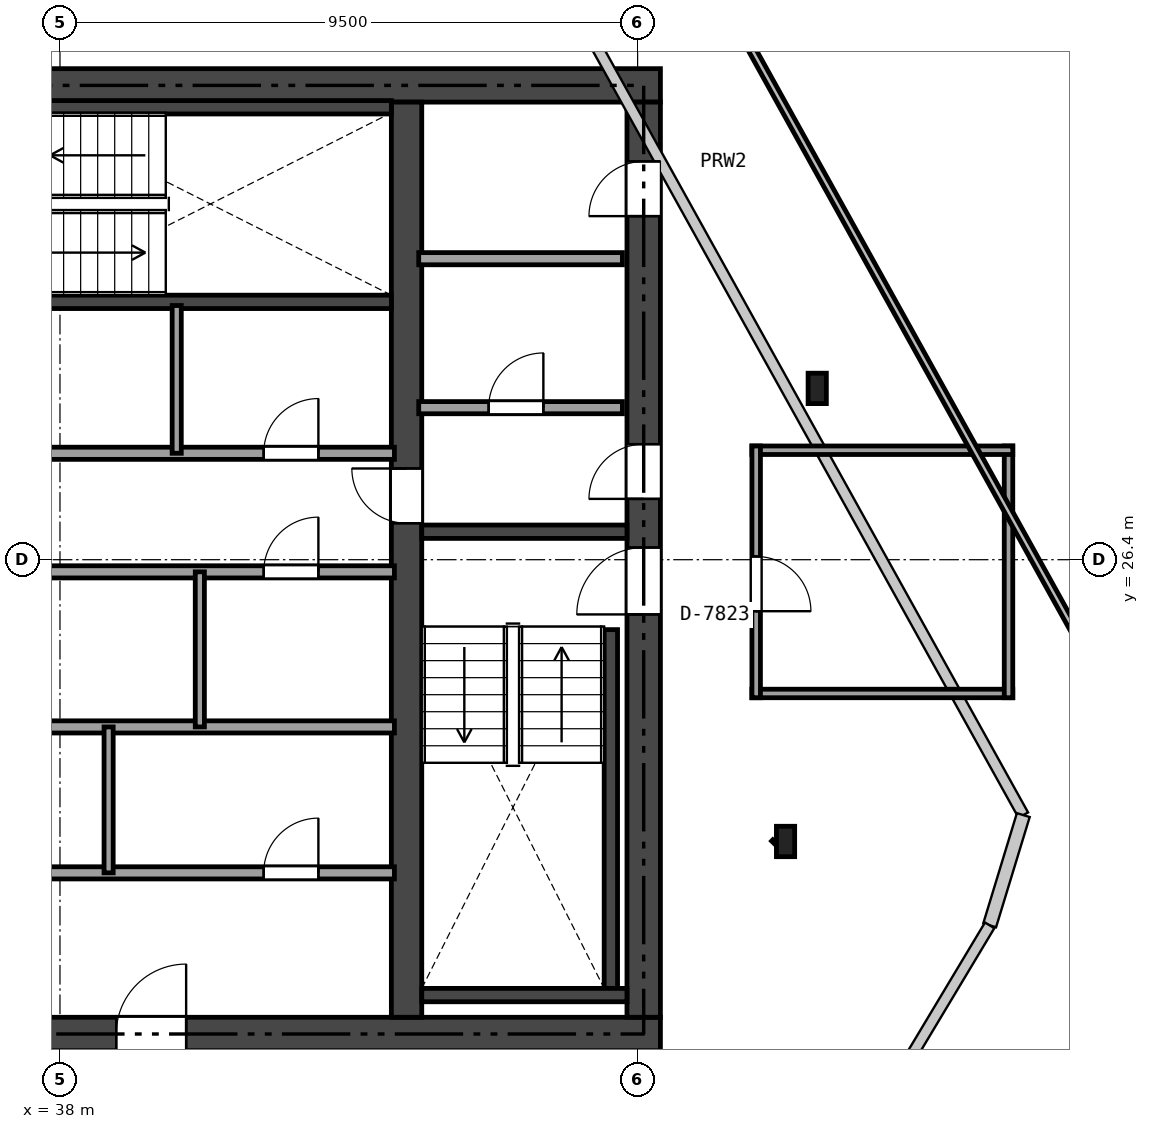
"""IFC4 building model, lengths in metres.
Left out: names, types, materials, properties, quantities, classifications, styles, units other than length and angle.
Written with IfcOpenShell. Run it as: python <this file> out.ifc"""

import sys

from ifc_helpers import new_model, si_unit, direction, frame, frame_2d, origin, origin_2d, place, context, subcontext, project, spatial, rectangle, i_section, extrude, element, fill, save


model = new_model("IFC4")
c1 = context("Model", 3, precision=1e-05, world=origin(), true_north=direction((0.0, 1.0)))
c2 = subcontext(c1, "Body", "Model", "MODEL_VIEW")
j1 = project(units=[si_unit("LENGTHUNIT", "METRE"), si_unit("PLANEANGLEUNIT", "RADIAN")], contexts=[c1])
p1 = place(None, origin())
s1 = spatial("IfcSite", under=j1, at=p1, CompositionType="ELEMENT")
p2 = place(p1, origin())
s2 = spatial("IfcBuilding", under=s1, at=p2, CompositionType="ELEMENT")
p3 = place(p2, frame((0.0, 0.0, 289.9)))
s3 = spatial("IfcBuildingStorey", under=s2, at=p3, CompositionType="ELEMENT", Elevation=289.9)
p4 = place(p3, frame((26.525, 18.6, 0.0), z_axis=(0.0, 0.0, 1.0), x_axis=(1.0, 0.0, 0.0)))
e1 = element("IfcWall", 1, at=p4, inside=s3, PredefinedType="SHEAR", context=c2, shape_type="SweptSolid", body=[
    extrude(rectangle(XDim=21.35, YDim=0.55, at=frame_2d((10.675, 0.0))), origin(), (0.0, 0.0, 1.0), 2.58),
])
p5 = place(p4, frame((12.4, 0.0, 0.0)))
e2 = element("IfcOpeningElement", 2, at=p5, cuts=e1, PredefinedType="OPENING", context=c2, shape_type="SweptSolid", body=[
    extrude(rectangle(XDim=1.15, YDim=2.15, at=frame_2d((0.575, 1.075))), frame((0.0, 0.285, 0.0), z_axis=(0.0, -1.0, 0.0), x_axis=(1.0, 0.0, 0.0)), (0.0, 0.0, 1.0), 0.57),
])
p6 = place(p4, frame((5.225, 0.0, 0.0)))
e3 = element("IfcOpeningElement", 3, at=p6, cuts=e1, PredefinedType="OPENING", context=c2, shape_type="SweptSolid", body=[
    extrude(rectangle(XDim=0.9, YDim=2.1, at=frame_2d((0.45, 1.05))), frame((0.0, 0.285, 0.0), z_axis=(0.0, -1.0, 0.0), x_axis=(1.0, 0.0, 0.0)), (0.0, 0.0, 1.0), 0.57),
])
p7 = place(p3, frame((26.525, 34.2, 0.0), z_axis=(0.0, 0.0, 1.0), x_axis=(1.0, 0.0, 0.0)))
e4 = element("IfcWall", 4, at=p7, inside=s3, PredefinedType="SHEAR", context=c2, shape_type="SweptSolid", body=[
    extrude(rectangle(XDim=21.35, YDim=0.55, at=frame_2d((10.675, 0.0))), origin(), (0.0, 0.0, 1.0), 2.58),
])
p8 = place(p7, frame((9.675, 0.0, 0.0)))
e5 = element("IfcOpeningElement", 5, at=p8, cuts=e4, PredefinedType="OPENING", context=c2, shape_type="SweptSolid", body=[
    extrude(rectangle(XDim=1.1, YDim=2.15, at=frame_2d((0.55, 1.075))), frame((0.0, 0.285, 0.0), z_axis=(0.0, -1.0, 0.0), x_axis=(1.0, 0.0, 0.0)), (0.0, 0.0, 1.0), 0.57),
])
p9 = place(p7, frame((1.925, 0.0, 0.0)))
e6 = element("IfcOpeningElement", 6, at=p9, cuts=e4, PredefinedType="OPENING", context=c2, shape_type="SweptSolid", body=[
    extrude(rectangle(XDim=0.9, YDim=2.1, at=frame_2d((0.45, 1.05))), frame((0.0, 0.285, 0.0), z_axis=(0.0, -1.0, 0.0), x_axis=(1.0, 0.0, 0.0)), (0.0, 0.0, 1.0), 0.57),
])
p10 = place(p7, frame((6.225, 0.0, 0.0)))
e7 = element("IfcOpeningElement", 7, at=p10, cuts=e4, PredefinedType="OPENING", context=c2, shape_type="SweptSolid", body=[
    extrude(rectangle(XDim=0.9, YDim=2.1, at=frame_2d((0.45, 1.05))), frame((0.0, 0.285, 0.0), z_axis=(0.0, -1.0, 0.0), x_axis=(1.0, 0.0, 0.0)), (0.0, 0.0, 1.0), 0.57),
])
p11 = place(p3, frame((47.6, 18.875, 0.0), z_axis=(0.0, 0.0, 1.0), x_axis=(0.0, 1.0, 0.0)))
e8 = element("IfcWall", 8, at=p11, inside=s3, PredefinedType="SHEAR", context=c2, shape_type="SweptSolid", body=[
    extrude(rectangle(XDim=15.05, YDim=0.55, at=frame_2d((7.525, 0.0))), origin(), (0.0, 0.0, 1.0), 2.58),
])
p12 = place(p11, frame((6.625, 0.0, 0.0)))
e9 = element("IfcOpeningElement", 9, at=p12, cuts=e8, PredefinedType="OPENING", context=c2, shape_type="SweptSolid", body=[
    extrude(rectangle(XDim=1.1, YDim=2.15, at=frame_2d((0.55, 1.075))), frame((0.0, 0.285, 0.0), z_axis=(0.0, -1.0, 0.0), x_axis=(1.0, 0.0, 0.0)), (0.0, 0.0, 1.0), 0.57),
])
p13 = place(p11, frame((8.525, 0.0, 0.0)))
e10 = element("IfcOpeningElement", 10, at=p13, cuts=e8, PredefinedType="OPENING", context=c2, shape_type="SweptSolid", body=[
    extrude(rectangle(XDim=0.9, YDim=2.1, at=frame_2d((0.45, 1.05))), frame((0.0, 0.285, 0.0), z_axis=(0.0, -1.0, 0.0), x_axis=(1.0, 0.0, 0.0)), (0.0, 0.0, 1.0), 0.57),
])
p14 = place(p11, frame((13.175, 0.0, 0.0)))
e11 = element("IfcOpeningElement", 11, at=p14, cuts=e8, PredefinedType="OPENING", context=c2, shape_type="SweptSolid", body=[
    extrude(rectangle(XDim=0.9, YDim=2.1, at=frame_2d((0.45, 1.05))), frame((0.0, 0.285, 0.0), z_axis=(0.0, -1.0, 0.0), x_axis=(1.0, 0.0, 0.0)), (0.0, 0.0, 1.0), 0.57),
])
p15 = place(p3, frame((43.7, 18.875, 0.0), z_axis=(0.0, 0.0, 1.0), x_axis=(0.0, 1.0, 0.0)))
e12 = element("IfcWall", 12, at=p15, inside=s3, PredefinedType="SHEAR", context=c2, shape_type="SweptSolid", body=[
    extrude(rectangle(XDim=15.05, YDim=0.5, at=frame_2d((7.525, 0.0))), origin(), (0.0, 0.0, 1.0), 2.58),
])
p16 = place(p15, frame((8.125, 0.0, 0.0)))
e13 = element("IfcOpeningElement", 13, at=p16, cuts=e12, PredefinedType="OPENING", context=c2, shape_type="SweptSolid", body=[
    extrude(rectangle(XDim=0.9, YDim=2.1, at=frame_2d((0.45, 1.05))), frame((0.0, 0.26, 0.0), z_axis=(0.0, -1.0, 0.0), x_axis=(1.0, 0.0, 0.0)), (0.0, 0.0, 1.0), 0.52),
])
p17 = place(p3, frame((43.95, 26.86, 0.0), z_axis=(0.0, 0.0, 1.0), x_axis=(1.0, 0.0, 0.0)))
e14 = element("IfcWall", 14, at=p17, inside=s3, PredefinedType="SHEAR", context=c2, shape_type="SweptSolid", body=[
    extrude(rectangle(XDim=3.375, YDim=0.22, at=frame_2d((1.688, 0.0))), origin(), (0.0, 0.0, 1.0), 2.58),
])
p18 = place(p3, frame((47.06, 19.35, 0.0), z_axis=(0.0, 0.0, 1.0), x_axis=(0.0, 1.0, 0.0)))
e15 = element("IfcWall", 15, at=p18, inside=s3, PredefinedType="SHEAR", context=c2, shape_type="SweptSolid", body=[
    extrude(rectangle(XDim=5.9, YDim=0.22, at=frame_2d((2.95, 0.0))), origin(), (0.0, 0.0, 1.0), 2.58),
])
p19 = place(p3, frame((43.95, 19.24, 0.0), z_axis=(0.0, 0.0, 1.0), x_axis=(1.0, 0.0, 0.0)))
e16 = element("IfcWall", 16, at=p19, inside=s3, PredefinedType="SHEAR", context=c2, shape_type="SweptSolid", body=[
    extrude(rectangle(XDim=3.375, YDim=0.22, at=frame_2d((1.688, 0.0))), origin(), (0.0, 0.0, 1.0), 2.58),
])
p20 = place(p3, frame((35.84, 30.64, 0.0), z_axis=(0.0, 0.0, 1.0), x_axis=(1.0, 0.0, 0.0)))
e17 = element("IfcWall", 17, at=p20, inside=s3, PredefinedType="SHEAR", context=c2, shape_type="SweptSolid", body=[
    extrude(rectangle(XDim=7.61, YDim=0.22, at=frame_2d((3.805, 0.0))), origin(), (0.0, 0.0, 1.0), 2.58),
])
p21 = place(p3, frame((37.55, 33.84, 0.0), z_axis=(0.0, 0.0, 1.0), x_axis=(1.0, 0.0, 0.0)))
e18 = element("IfcWall", 18, at=p21, inside=s3, PredefinedType="SHEAR", context=c2, shape_type="SweptSolid", body=[
    extrude(rectangle(XDim=5.9, YDim=0.22, at=frame_2d((2.95, 0.0))), origin(), (0.0, 0.0, 1.0), 2.58),
])
for number, where, z_axis, x_axis in (
    (19, (50.454, 29.217, 0.0), (0.0, 0.0, 1.0), (1.0, 0.0, 0.0)),
    (20, (49.933, 21.766, 0.0), (0.0, 0.0, 1.0), (1.0, 0.0, 0.0)),
):
    element("IfcColumn", number, at=place(p3, frame(where, z_axis=z_axis, x_axis=x_axis)), inside=s3, PredefinedType="COLUMN", context=c2, shape_type="SweptSolid", body=[
        extrude(i_section(OverallWidth=0.3, OverallDepth=0.5, WebThickness=0.015, FlangeThickness=0.028, at=origin_2d()), origin(), (0.0, 0.0, 1.0), 2.58),
    ])
p22 = place(p3, frame((42.435, 42.747, 0.0), z_axis=(0.0, 0.0, 1.0), x_axis=(0.485411824616, -0.874285628684, 0.0)))
e21 = element("IfcWall", 21, at=p22, inside=s3, PredefinedType="PARAPET", context=c2, shape_type="SweptSolid", body=[
    extrude(rectangle(XDim=23.502, YDim=0.18, at=frame_2d((11.751, 0.0))), origin(), (0.0, 0.0, 1.0), 1.15),
])
p23 = place(p3, frame((53.843, 22.2, 0.0), z_axis=(0.0, 0.0, 1.0), x_axis=(-0.29174073409, -0.956497435476, 0.0)))
e22 = element("IfcWall", 22, at=p23, inside=s3, PredefinedType="PARAPET", context=c2, shape_type="SweptSolid", body=[
    extrude(rectangle(XDim=1.896, YDim=0.22, at=frame_2d((0.948, 0.0))), origin(), (0.0, 0.0, 1.0), 1.15),
])
p24 = place(p3, frame((53.29, 20.387, 0.0), z_axis=(0.0, 0.0, 1.0), x_axis=(-0.514392221685, -0.857555037459, 0.0)))
e23 = element("IfcWall", 23, at=p24, inside=s3, PredefinedType="PARAPET", context=c2, shape_type="SweptSolid", body=[
    extrude(rectangle(XDim=6.242, YDim=0.18, at=frame_2d((3.121, 0.0))), origin(), (0.0, 0.0, 1.0), 1.15),
])
p25 = place(p3, frame((43.9, 28.9, 0.0), z_axis=(0.0, 0.0, 1.0), x_axis=(1.0, 0.0, 0.0)))
e24 = element("IfcWall", 24, at=p25, inside=s3, PredefinedType="SOLIDWALL", context=c2, shape_type="SweptSolid", body=[
    extrude(rectangle(XDim=3.35, YDim=0.2, at=frame_2d((1.675, 0.0))), origin(), (0.0, 0.0, 1.0), 2.58),
])
p26 = place(p25, frame((1.15, 0.0, 0.0)))
e25 = element("IfcOpeningElement", 25, at=p26, cuts=e24, PredefinedType="OPENING", context=c2, shape_type="SweptSolid", body=[
    extrude(rectangle(XDim=0.9, YDim=2.1, at=frame_2d((0.45, 1.05))), frame((0.0, 0.11, 0.0), z_axis=(0.0, -1.0, 0.0), x_axis=(1.0, 0.0, 0.0)), (0.0, 0.0, 1.0), 0.22),
])
p27 = place(p3, frame((43.9, 31.35, 0.0), z_axis=(0.0, 0.0, 1.0), x_axis=(1.0, 0.0, 0.0)))
e26 = element("IfcWall", 26, at=p27, inside=s3, PredefinedType="SOLIDWALL", context=c2, shape_type="SweptSolid", body=[
    extrude(rectangle(XDim=3.35, YDim=0.2, at=frame_2d((1.675, 0.0))), origin(), (0.0, 0.0, 1.0), 2.58),
])
p28 = place(p3, frame((35.62, 28.15, 0.0), z_axis=(0.0, 0.0, 1.0), x_axis=(1.0, 0.0, 0.0)))
e27 = element("IfcWall", 27, at=p28, inside=s3, PredefinedType="SOLIDWALL", context=c2, shape_type="SweptSolid", body=[
    extrude(rectangle(XDim=7.88, YDim=0.2, at=frame_2d((3.94, 0.0))), origin(), (0.0, 0.0, 1.0), 2.58),
])
p29 = place(p28, frame((1.13, 0.0, 0.0)))
e28 = element("IfcOpeningElement", 28, at=p29, cuts=e27, PredefinedType="OPENING", context=c2, shape_type="SweptSolid", body=[
    extrude(rectangle(XDim=0.9, YDim=2.1, at=frame_2d((0.45, 1.05))), frame((0.0, 0.11, 0.0), z_axis=(0.0, -1.0, 0.0), x_axis=(1.0, 0.0, 0.0)), (0.0, 0.0, 1.0), 0.22),
])
p30 = place(p28, frame((5.73, 0.0, 0.0)))
e29 = element("IfcOpeningElement", 29, at=p30, cuts=e27, PredefinedType="OPENING", context=c2, shape_type="SweptSolid", body=[
    extrude(rectangle(XDim=0.9, YDim=2.1, at=frame_2d((0.45, 1.05))), frame((0.0, 0.11, 0.0), z_axis=(0.0, -1.0, 0.0), x_axis=(1.0, 0.0, 0.0)), (0.0, 0.0, 1.0), 0.22),
])
p31 = place(p3, frame((35.62, 26.2, 0.0), z_axis=(0.0, 0.0, 1.0), x_axis=(1.0, 0.0, 0.0)))
e30 = element("IfcWall", 30, at=p31, inside=s3, PredefinedType="SOLIDWALL", context=c2, shape_type="SweptSolid", body=[
    extrude(rectangle(XDim=7.88, YDim=0.2, at=frame_2d((3.94, 0.0))), origin(), (0.0, 0.0, 1.0), 2.58),
])
p32 = place(p31, frame((1.13, 0.0, 0.0)))
e31 = element("IfcOpeningElement", 31, at=p32, cuts=e30, PredefinedType="OPENING", context=c2, shape_type="SweptSolid", body=[
    extrude(rectangle(XDim=0.9, YDim=2.1, at=frame_2d((0.45, 1.05))), frame((0.0, 0.11, 0.0), z_axis=(0.0, -1.0, 0.0), x_axis=(1.0, 0.0, 0.0)), (0.0, 0.0, 1.0), 0.22),
])
p33 = place(p31, frame((5.73, 0.0, 0.0)))
e32 = element("IfcOpeningElement", 32, at=p33, cuts=e30, PredefinedType="OPENING", context=c2, shape_type="SweptSolid", body=[
    extrude(rectangle(XDim=0.9, YDim=2.1, at=frame_2d((0.45, 1.05))), frame((0.0, 0.11, 0.0), z_axis=(0.0, -1.0, 0.0), x_axis=(1.0, 0.0, 0.0)), (0.0, 0.0, 1.0), 0.22),
])
p34 = place(p3, frame((35.62, 23.65, 0.0), z_axis=(0.0, 0.0, 1.0), x_axis=(1.0, 0.0, 0.0)))
e33 = element("IfcWall", 33, at=p34, inside=s3, PredefinedType="SOLIDWALL", context=c2, shape_type="SweptSolid", body=[
    extrude(rectangle(XDim=7.88, YDim=0.2, at=frame_2d((3.94, 0.0))), origin(), (0.0, 0.0, 1.0), 2.101),
])
p35 = place(p3, frame((35.62, 21.25, 0.0), z_axis=(0.0, 0.0, 1.0), x_axis=(1.0, 0.0, 0.0)))
e34 = element("IfcWall", 34, at=p35, inside=s3, PredefinedType="SOLIDWALL", context=c2, shape_type="SweptSolid", body=[
    extrude(rectangle(XDim=7.88, YDim=0.2, at=frame_2d((3.94, 0.0))), origin(), (0.0, 0.0, 1.0), 2.58),
])
p36 = place(p35, frame((1.13, 0.0, 0.0)))
e35 = element("IfcOpeningElement", 35, at=p36, cuts=e34, PredefinedType="OPENING", context=c2, shape_type="SweptSolid", body=[
    extrude(rectangle(XDim=0.9, YDim=2.1, at=frame_2d((0.45, 1.05))), frame((0.0, 0.11, 0.0), z_axis=(0.0, -1.0, 0.0), x_axis=(1.0, 0.0, 0.0)), (0.0, 0.0, 1.0), 0.22),
])
p37 = place(p35, frame((5.73, 0.0, 0.0)))
e36 = element("IfcOpeningElement", 36, at=p37, cuts=e34, PredefinedType="OPENING", context=c2, shape_type="SweptSolid", body=[
    extrude(rectangle(XDim=0.9, YDim=2.1, at=frame_2d((0.45, 1.05))), frame((0.0, 0.11, 0.0), z_axis=(0.0, -1.0, 0.0), x_axis=(1.0, 0.0, 0.0)), (0.0, 0.0, 1.0), 0.22),
])
p38 = place(p3, frame((39.92, 28.15, 0.0), z_axis=(0.0, 0.0, 1.0), x_axis=(0.0, 1.0, 0.0)))
e37 = element("IfcWall", 37, at=p38, inside=s3, PredefinedType="PARTITIONING", context=c2, shape_type="SweptSolid", body=[
    extrude(rectangle(XDim=2.43, YDim=0.15, at=frame_2d((1.215, 0.0))), origin(), (0.0, 0.0, 1.0), 2.58),
])
p39 = place(p3, frame((40.3, 23.65, 0.0), z_axis=(0.0, 0.0, 1.0), x_axis=(0.0, 1.0, 0.0)))
e38 = element("IfcWall", 38, at=p39, inside=s3, PredefinedType="PARTITIONING", context=c2, shape_type="SweptSolid", body=[
    extrude(rectangle(XDim=2.55, YDim=0.15, at=frame_2d((1.275, 0.0))), origin(), (0.0, 0.0, 1.0), 2.101),
])
p40 = place(p3, frame((38.8, 21.25, 0.0), z_axis=(0.0, 0.0, 1.0), x_axis=(0.0, 1.0, 0.0)))
e39 = element("IfcWall", 39, at=p40, inside=s3, PredefinedType="PARTITIONING", context=c2, shape_type="SweptSolid", body=[
    extrude(rectangle(XDim=2.4, YDim=0.15, at=frame_2d((1.2, 0.0))), origin(), (0.0, 0.0, 1.0), 2.101),
])
p41 = place(p3, frame((49.38, 24.2, 0.0), z_axis=(0.0, 0.0, 1.0), x_axis=(1.0, 0.0, 0.0)))
e40 = element("IfcWall", 40, at=p41, inside=s3, PredefinedType="PARTITIONING", context=c2, shape_type="SweptSolid", body=[
    extrude(rectangle(XDim=4.29, YDim=0.14, at=frame_2d((2.145, 0.0))), origin(), (0.0, 0.0, 1.0), 1.665),
])
p42 = place(p3, frame((53.6, 24.13, 0.0), z_axis=(0.0, 0.0, 1.0), x_axis=(0.0, 1.0, 0.0)))
e41 = element("IfcWall", 41, at=p42, inside=s3, PredefinedType="PARTITIONING", context=c2, shape_type="SweptSolid", body=[
    extrude(rectangle(XDim=4.14, YDim=0.14, at=frame_2d((2.07, 0.0))), origin(), (0.0, 0.0, 1.0), 2.58),
])
p43 = place(p3, frame((53.67, 28.2, 0.0), z_axis=(0.0, 0.0, 1.0), x_axis=(-1.0, 0.0, 0.0)))
e42 = element("IfcWall", 42, at=p43, inside=s3, PredefinedType="PARTITIONING", context=c2, shape_type="SweptSolid", body=[
    extrude(rectangle(XDim=4.29, YDim=0.14, at=frame_2d((2.145, 0.0))), origin(), (0.0, 0.0, 1.0), 1.665),
])
p44 = place(p3, frame((49.45, 28.27, 0.0), z_axis=(0.0, 0.0, 1.0), x_axis=(0.0, -1.0, 0.0)))
e43 = element("IfcWall", 43, at=p44, inside=s3, PredefinedType="PARTITIONING", context=c2, shape_type="SweptSolid", body=[
    extrude(rectangle(XDim=4.14, YDim=0.14, at=frame_2d((2.07, 0.0))), origin(), (0.0, 0.0, 1.0), 2.58),
])
p45 = place(p44, frame((1.817, 0.0, 0.0)))
e44 = element("IfcOpeningElement", 44, at=p45, cuts=e43, PredefinedType="OPENING", context=c2, shape_type="SweptSolid", body=[
    extrude(rectangle(XDim=0.9, YDim=2.0, at=frame_2d((0.45, 1.0))), frame((0.0, 0.08, 0.0), z_axis=(0.0, -1.0, 0.0), x_axis=(1.0, 0.0, 0.0)), (0.0, 0.0, 1.0), 0.16),
])
p46 = place(p12, origin())
e45 = element("IfcDoor", 45, at=p46, inside=s3, OperationType="SINGLE_SWING_LEFT", PredefinedType="DOOR", context=c2, shape_type="SweptSolid", body=[
    extrude(rectangle(XDim=1.1, YDim=2.15, at=frame_2d((0.55, 1.075))), frame((0.0, 0.025, 0.0), z_axis=(0.0, -1.0, 0.0), x_axis=(1.0, 0.0, 0.0)), (0.0, 0.0, 1.0), 0.05),
])
fill(e9, e45)
p47 = place(p16, origin())
e46 = element("IfcDoor", 46, at=p47, inside=s3, OperationType="SINGLE_SWING_RIGHT", PredefinedType="DOOR", context=c2, shape_type="SweptSolid", body=[
    extrude(rectangle(XDim=0.9, YDim=2.1, at=frame_2d((0.45, 1.05))), frame((0.0, 0.025, 0.0), z_axis=(0.0, -1.0, 0.0), x_axis=(1.0, 0.0, 0.0)), (0.0, 0.0, 1.0), 0.05),
])
fill(e13, e46)
p48 = place(p13, origin())
e47 = element("IfcDoor", 47, at=p48, inside=s3, OperationType="SINGLE_SWING_LEFT", PredefinedType="DOOR", context=c2, shape_type="SweptSolid", body=[
    extrude(rectangle(XDim=0.9, YDim=2.1, at=frame_2d((0.45, 1.05))), frame((0.0, 0.025, 0.0), z_axis=(0.0, -1.0, 0.0), x_axis=(1.0, 0.0, 0.0)), (0.0, 0.0, 1.0), 0.05),
])
fill(e10, e47)
p49 = place(p5, origin())
e48 = element("IfcDoor", 48, at=p49, inside=s3, OperationType="SINGLE_SWING_RIGHT", PredefinedType="DOOR", context=c2, shape_type="SweptSolid", body=[
    extrude(rectangle(XDim=1.15, YDim=2.15, at=frame_2d((0.575, 1.075))), frame((0.0, 0.025, 0.0), z_axis=(0.0, -1.0, 0.0), x_axis=(1.0, 0.0, 0.0)), (0.0, 0.0, 1.0), 0.05),
])
fill(e2, e48)
p50 = place(p26, origin())
e49 = element("IfcDoor", 49, at=p50, inside=s3, OperationType="SINGLE_SWING_RIGHT", PredefinedType="DOOR", context=c2, shape_type="SweptSolid", body=[
    extrude(rectangle(XDim=0.9, YDim=2.1, at=frame_2d((0.45, 1.05))), frame((0.0, 0.025, 0.0), z_axis=(0.0, -1.0, 0.0), x_axis=(1.0, 0.0, 0.0)), (0.0, 0.0, 1.0), 0.05),
])
fill(e25, e49)
p51 = place(p14, origin())
e50 = element("IfcDoor", 50, at=p51, inside=s3, OperationType="SINGLE_SWING_LEFT", PredefinedType="DOOR", context=c2, shape_type="SweptSolid", body=[
    extrude(rectangle(XDim=0.9, YDim=2.1, at=frame_2d((0.45, 1.05))), frame((0.0, 0.025, 0.0), z_axis=(0.0, -1.0, 0.0), x_axis=(1.0, 0.0, 0.0)), (0.0, 0.0, 1.0), 0.05),
])
fill(e11, e50)
p52 = place(p37, origin())
e51 = element("IfcDoor", 51, at=p52, inside=s3, OperationType="SINGLE_SWING_RIGHT", PredefinedType="DOOR", context=c2, shape_type="SweptSolid", body=[
    extrude(rectangle(XDim=0.9, YDim=2.1, at=frame_2d((0.45, 1.05))), frame((0.0, 0.025, 0.0), z_axis=(0.0, -1.0, 0.0), x_axis=(1.0, 0.0, 0.0)), (0.0, 0.0, 1.0), 0.05),
])
fill(e36, e51)
p53 = place(p33, origin())
e52 = element("IfcDoor", 52, at=p53, inside=s3, OperationType="SINGLE_SWING_RIGHT", PredefinedType="DOOR", context=c2, shape_type="SweptSolid", body=[
    extrude(rectangle(XDim=0.9, YDim=2.1, at=frame_2d((0.45, 1.05))), frame((0.0, 0.025, 0.0), z_axis=(0.0, -1.0, 0.0), x_axis=(1.0, 0.0, 0.0)), (0.0, 0.0, 1.0), 0.05),
])
fill(e32, e52)
p54 = place(p30, origin())
e53 = element("IfcDoor", 53, at=p54, inside=s3, OperationType="SINGLE_SWING_RIGHT", PredefinedType="DOOR", context=c2, shape_type="SweptSolid", body=[
    extrude(rectangle(XDim=0.9, YDim=2.1, at=frame_2d((0.45, 1.05))), frame((0.0, 0.025, 0.0), z_axis=(0.0, -1.0, 0.0), x_axis=(1.0, 0.0, 0.0)), (0.0, 0.0, 1.0), 0.05),
])
fill(e29, e53)
p55 = place(p45, origin())
e54 = element("IfcDoor", 54, at=p55, inside=s3, OperationType="SINGLE_SWING_RIGHT", PredefinedType="DOOR", context=c2, shape_type="SweptSolid", body=[
    extrude(rectangle(XDim=0.9, YDim=2.0, at=frame_2d((0.45, 1.0))), frame((0.0, 0.025, 0.0), z_axis=(0.0, -1.0, 0.0), x_axis=(1.0, 0.0, 0.0)), (0.0, 0.0, 1.0), 0.05),
])
fill(e44, e54)
save(model, sys.argv[1])
